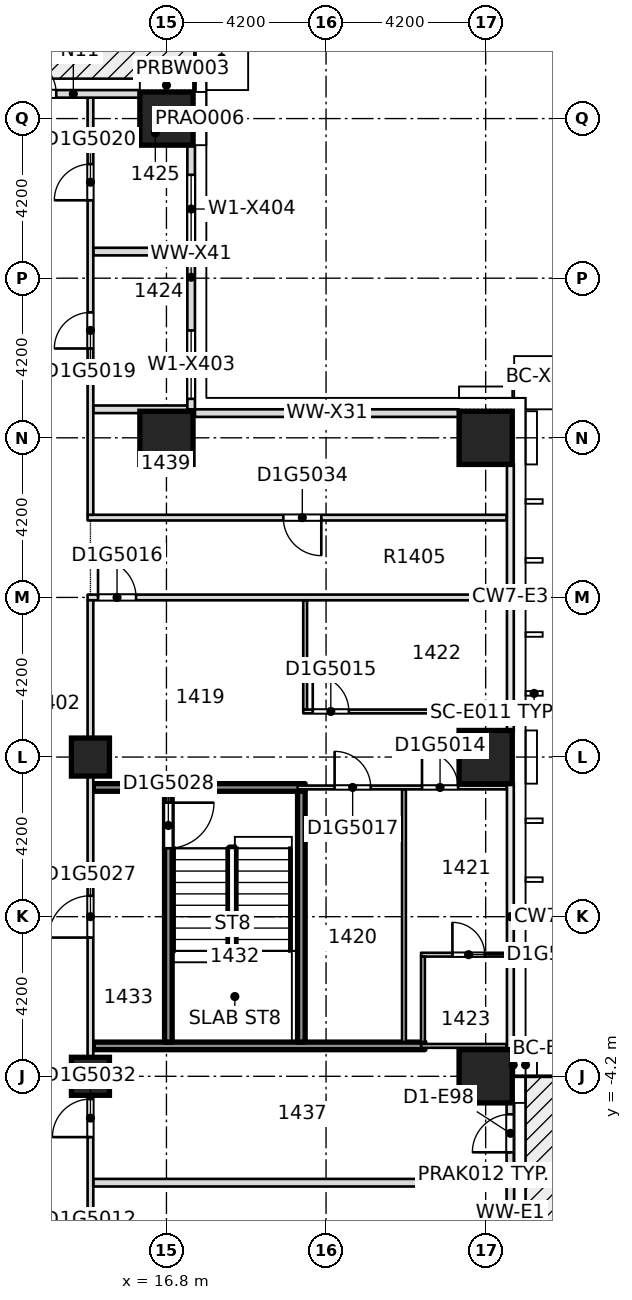
"""IFC4 building model, lengths in metres.
Left out: names, types, materials, properties, quantities, classifications, styles, units other than length and angle.
Written with IfcOpenShell. Run it as: python <this file> out.ifc"""

import sys

from ifc_helpers import new_model, si_unit, direction, frame, frame_2d, origin, origin_2d, place, context, subcontext, project, spatial, rectangle, extrude, element, fill, save


model = new_model("IFC4")
c1 = context("Model", 3, precision=1e-05, world=origin(), true_north=direction((0.0, 1.0)))
c2 = subcontext(c1, "Body", "Model", "MODEL_VIEW")
j1 = project(units=[si_unit("LENGTHUNIT", "METRE"), si_unit("PLANEANGLEUNIT", "RADIAN")], contexts=[c1])
p1 = place(None, origin())
s1 = spatial("IfcSite", under=j1, at=p1, CompositionType="ELEMENT")
p2 = place(p1, origin())
s2 = spatial("IfcBuilding", under=s1, at=p2, CompositionType="ELEMENT")
p3 = place(p2, frame((0.0, 0.0, 62.1)))
s3 = spatial("IfcBuildingStorey", under=s2, at=p3, CompositionType="ELEMENT", Elevation=62.1)
for number, where, z_axis, x_axis in (
    (1, (25.2, -4.2, -0.32), (0.0, 0.0, 1.0), (1.0, 0.0, 0.0)),
    (2, (25.2, 4.2, -0.32), (0.0, 0.0, 1.0), (1.0, 0.0, 0.0)),
    (3, (16.8, 12.6, -0.32), (0.0, 0.0, 1.0), (1.0, 0.0, 0.0)),
    (4, (25.2, 12.6, -0.32), (0.0, 0.0, 1.0), (1.0, 0.0, 0.0)),
    (5, (16.8, 21.0, -0.32), (0.0, 0.0, 1.0), (1.0, 0.0, 0.0)),
):
    element("IfcColumn", number, at=place(p3, frame(where, z_axis=z_axis, x_axis=x_axis)), inside=s3, PredefinedType="COLUMN", context=c2, shape_type="SweptSolid", body=[
        extrude(rectangle(XDim=1.4, YDim=1.4, at=origin_2d()), origin(), (0.0, 0.0, 1.0), 3.45),
    ])
for number, where, z_axis, x_axis in (
    (6, (14.8, -4.2, -0.32), (0.0, 0.0, 1.0), (1.0, 0.0, 0.0)),
    (7, (14.8, 4.2, -0.32), (0.0, 0.0, 1.0), (1.0, 0.0, 0.0)),
):
    element("IfcColumn", number, at=place(p3, frame(where, z_axis=z_axis, x_axis=x_axis)), inside=s3, PredefinedType="COLUMN", context=c2, shape_type="SweptSolid", body=[
        extrude(rectangle(XDim=1.0, YDim=1.0, at=origin_2d()), origin(), (0.0, 0.0, 1.0), 3.45),
    ])
p4 = place(p3, frame((14.875, -7.0, 0.0), z_axis=(0.0, 0.0, 1.0), x_axis=(1.0, 0.0, 0.0)))
e8 = element("IfcWall", 8, at=p4, inside=s3, PredefinedType="PARTITIONING", context=c2, shape_type="SweptSolid", body=[
    extrude(rectangle(XDim=10.875, YDim=0.2, at=frame_2d((5.438, 0.0))), origin(), (0.0, 0.0, 1.0), 3.13),
])
p5 = place(p3, frame((14.875, -3.4, 0.0), z_axis=(0.0, 0.0, 1.0), x_axis=(1.0, 0.0, 0.0)))
e9 = element("IfcWall", 9, at=p5, inside=s3, PredefinedType="SOLIDWALL", context=c2, shape_type="SweptSolid", body=[
    extrude(rectangle(XDim=8.725, YDim=0.2, at=frame_2d((4.363, 0.0))), origin(), (0.0, 0.0, 1.0), 3.13),
])
p6 = place(p3, frame((23.5, -3.4, 0.0), z_axis=(0.0, 0.0, 1.0), x_axis=(1.0, 0.0, 0.0)))
e10 = element("IfcWall", 10, at=p6, inside=s3, PredefinedType="PARTITIONING", context=c2, shape_type="SweptSolid", body=[
    extrude(rectangle(XDim=2.25, YDim=0.1, at=frame_2d((1.125, 0.0))), origin(), (0.0, 0.0, 1.0), 3.13),
])
p7 = place(p3, frame((23.5, -1.0, 0.0), z_axis=(0.0, 0.0, 1.0), x_axis=(1.0, 0.0, 0.0)))
e11 = element("IfcWall", 11, at=p7, inside=s3, PredefinedType="PARTITIONING", context=c2, shape_type="SweptSolid", body=[
    extrude(rectangle(XDim=2.25, YDim=0.1, at=frame_2d((1.125, 0.0))), origin(), (0.0, 0.0, 1.0), 3.13),
])
p8 = place(p7, frame((0.825, 0.0, 0.0)))
e12 = element("IfcOpeningElement", 12, at=p8, cuts=e11, PredefinedType="OPENING", context=c2, shape_type="SweptSolid", body=[
    extrude(rectangle(XDim=0.85, YDim=2.1, at=frame_2d((0.425, 1.05))), frame((0.0, 0.06, 0.0), z_axis=(0.0, -1.0, 0.0), x_axis=(1.0, 0.0, 0.0)), (0.0, 0.0, 1.0), 0.12),
])
p9 = place(p3, frame((14.875, 3.4, 0.0), z_axis=(0.0, 0.0, 1.0), x_axis=(1.0, 0.0, 0.0)))
e13 = element("IfcWall", 13, at=p9, inside=s3, PredefinedType="SOLIDWALL", context=c2, shape_type="SweptSolid", body=[
    extrude(rectangle(XDim=5.575, YDim=0.2, at=frame_2d((2.788, 0.0))), origin(), (0.0, 0.0, 1.0), 3.13),
])
p10 = place(p3, frame((20.25, 3.4, 0.0), z_axis=(0.0, 0.0, 1.0), x_axis=(1.0, 0.0, 0.0)))
e14 = element("IfcWall", 14, at=p10, inside=s3, PredefinedType="PARTITIONING", context=c2, shape_type="SweptSolid", body=[
    extrude(rectangle(XDim=5.5, YDim=0.1, at=frame_2d((2.75, 0.0))), origin(), (0.0, 0.0, 1.0), 3.13),
])
p11 = place(p10, frame((3.275, 0.0, 0.0)))
e15 = element("IfcOpeningElement", 15, at=p11, cuts=e14, PredefinedType="OPENING", context=c2, shape_type="SweptSolid", body=[
    extrude(rectangle(XDim=0.95, YDim=2.1, at=frame_2d((0.475, 1.05))), frame((0.0, 0.06, 0.0), z_axis=(0.0, -1.0, 0.0), x_axis=(1.0, 0.0, 0.0)), (0.0, 0.0, 1.0), 0.12),
])
p12 = place(p10, frame((0.975, 0.0, 0.0)))
e16 = element("IfcOpeningElement", 16, at=p12, cuts=e14, PredefinedType="OPENING", context=c2, shape_type="SweptSolid", body=[
    extrude(rectangle(XDim=0.95, YDim=2.1, at=frame_2d((0.475, 1.05))), frame((0.0, 0.06, 0.0), z_axis=(0.0, -1.0, 0.0), x_axis=(1.0, 0.0, 0.0)), (0.0, 0.0, 1.0), 0.12),
])
p13 = place(p3, frame((20.4, 5.4, 0.0), z_axis=(0.0, 0.0, 1.0), x_axis=(1.0, 0.0, 0.0)))
e17 = element("IfcWall", 17, at=p13, inside=s3, PredefinedType="PARTITIONING", context=c2, shape_type="SweptSolid", body=[
    extrude(rectangle(XDim=5.35, YDim=0.1, at=frame_2d((2.675, 0.0))), origin(), (0.0, 0.0, 1.0), 3.13),
])
p14 = place(p13, frame((0.25, 0.0, 0.0)))
e18 = element("IfcOpeningElement", 18, at=p14, cuts=e17, PredefinedType="OPENING", context=c2, shape_type="SweptSolid", body=[
    extrude(rectangle(XDim=0.95, YDim=2.1, at=frame_2d((0.475, 1.05))), frame((0.0, 0.06, 0.0), z_axis=(0.0, -1.0, 0.0), x_axis=(1.0, 0.0, 0.0)), (0.0, 0.0, 1.0), 0.12),
])
p15 = place(p3, frame((14.725, 8.4, 0.0), z_axis=(0.0, 0.0, 1.0), x_axis=(1.0, 0.0, 0.0)))
e19 = element("IfcWall", 19, at=p15, inside=s3, PredefinedType="PARTITIONING", context=c2, shape_type="SweptSolid", body=[
    extrude(rectangle(XDim=11.025, YDim=0.15, at=frame_2d((5.512, 0.0))), origin(), (0.0, 0.0, 1.0), 3.13),
])
p16 = place(p15, frame((0.275, 0.0, 0.0)))
e20 = element("IfcOpeningElement", 20, at=p16, cuts=e19, PredefinedType="OPENING", context=c2, shape_type="SweptSolid", body=[
    extrude(rectangle(XDim=1.0, YDim=2.1, at=frame_2d((0.5, 1.05))), frame((0.0, 0.085, 0.0), z_axis=(0.0, -1.0, 0.0), x_axis=(1.0, 0.0, 0.0)), (0.0, 0.0, 1.0), 0.17),
])
p17 = place(p3, frame((14.725, 10.5, 0.0), z_axis=(0.0, 0.0, 1.0), x_axis=(1.0, 0.0, 0.0)))
e21 = element("IfcWall", 21, at=p17, inside=s3, PredefinedType="PARTITIONING", context=c2, shape_type="SweptSolid", body=[
    extrude(rectangle(XDim=11.025, YDim=0.15, at=frame_2d((5.512, 0.0))), origin(), (0.0, 0.0, 1.0), 3.13),
])
p18 = place(p17, frame((5.15, 0.0, 0.0)))
e22 = element("IfcOpeningElement", 22, at=p18, cuts=e21, PredefinedType="OPENING", context=c2, shape_type="SweptSolid", body=[
    extrude(rectangle(XDim=1.0, YDim=2.1, at=frame_2d((0.5, 1.05))), frame((0.0, 0.085, 0.0), z_axis=(0.0, -1.0, 0.0), x_axis=(1.0, 0.0, 0.0)), (0.0, 0.0, 1.0), 0.17),
])
for number, where, z_axis, x_axis in (
    (23, (14.875, 13.35, 0.0), (0.0, 0.0, 1.0), (1.0, 0.0, 0.0)),
    (24, (14.875, 17.5, 0.0), (0.0, 0.0, 1.0), (1.0, 0.0, 0.0)),
):
    element("IfcWall", number, at=place(p3, frame(where, z_axis=z_axis, x_axis=x_axis)), inside=s3, PredefinedType="PARTITIONING", context=c2, shape_type="SweptSolid", body=[
        extrude(rectangle(XDim=2.475, YDim=0.2, at=frame_2d((1.238, 0.0))), origin(), (0.0, 0.0, 1.0), 3.13),
    ])
p19 = place(p3, frame((14.8, -9.85, 0.0), z_axis=(0.0, 0.0, 1.0), x_axis=(0.0, 1.0, 0.0)))
e25 = element("IfcWall", 25, at=p19, inside=s3, PredefinedType="PARTITIONING", context=c2, shape_type="SweptSolid", body=[
    extrude(rectangle(XDim=18.175, YDim=0.15, at=frame_2d((9.087, 0.0))), origin(), (0.0, 0.0, 1.0), 3.13),
])
p20 = place(p19, frame((0.3, 0.0, 0.0)))
e26 = element("IfcOpeningElement", 26, at=p20, cuts=e25, PredefinedType="OPENING", context=c2, shape_type="SweptSolid", body=[
    extrude(rectangle(XDim=0.95, YDim=2.1, at=frame_2d((0.475, 1.05))), frame((0.0, 0.085, 0.0), z_axis=(0.0, -1.0, 0.0), x_axis=(1.0, 0.0, 0.0)), (0.0, 0.0, 1.0), 0.17),
])
p21 = place(p19, frame((9.3, 0.0, 0.0)))
e27 = element("IfcOpeningElement", 27, at=p21, cuts=e25, PredefinedType="OPENING", context=c2, shape_type="SweptSolid", body=[
    extrude(rectangle(XDim=1.1, YDim=2.1, at=frame_2d((0.55, 1.05))), frame((0.0, 0.085, 0.0), z_axis=(0.0, -1.0, 0.0), x_axis=(1.0, 0.0, 0.0)), (0.0, 0.0, 1.0), 0.17),
])
p22 = place(p19, frame((4.05, 0.0, 0.0)))
e28 = element("IfcOpeningElement", 28, at=p22, cuts=e25, PredefinedType="OPENING", context=c2, shape_type="SweptSolid", body=[
    extrude(rectangle(XDim=1.0, YDim=2.1, at=frame_2d((0.5, 1.05))), frame((0.0, 0.085, 0.0), z_axis=(0.0, -1.0, 0.0), x_axis=(1.0, 0.0, 0.0)), (0.0, 0.0, 1.0), 0.17),
])
p23 = place(p3, frame((14.8, 10.575, 0.0), z_axis=(0.0, 0.0, 1.0), x_axis=(0.0, 1.0, 0.0)))
e29 = element("IfcWall", 29, at=p23, inside=s3, PredefinedType="PARTITIONING", context=c2, shape_type="SweptSolid", body=[
    extrude(rectangle(XDim=10.975, YDim=0.15, at=frame_2d((5.488, 0.0))), origin(), (0.0, 0.0, 1.0), 3.13),
])
p24 = place(p23, frame((4.375, 0.0, 0.0)))
e30 = element("IfcOpeningElement", 30, at=p24, cuts=e29, PredefinedType="OPENING", context=c2, shape_type="SweptSolid", body=[
    extrude(rectangle(XDim=0.95, YDim=2.1, at=frame_2d((0.475, 1.05))), frame((0.0, 0.085, 0.0), z_axis=(0.0, -1.0, 0.0), x_axis=(1.0, 0.0, 0.0)), (0.0, 0.0, 1.0), 0.17),
])
p25 = place(p23, frame((8.275, 0.0, 0.0)))
e31 = element("IfcOpeningElement", 31, at=p25, cuts=e29, PredefinedType="OPENING", context=c2, shape_type="SweptSolid", body=[
    extrude(rectangle(XDim=0.95, YDim=2.1, at=frame_2d((0.475, 1.05))), frame((0.0, 0.085, 0.0), z_axis=(0.0, -1.0, 0.0), x_axis=(1.0, 0.0, 0.0)), (0.0, 0.0, 1.0), 0.17),
])
p26 = place(p3, frame((16.85, -3.3, 0.0), z_axis=(0.0, 0.0, 1.0), x_axis=(0.0, 1.0, 0.0)))
e32 = element("IfcWall", 32, at=p26, inside=s3, PredefinedType="SOLIDWALL", context=c2, shape_type="SweptSolid", body=[
    extrude(rectangle(XDim=6.6, YDim=0.2, at=frame_2d((3.3, 0.0))), origin(), (0.0, 0.0, 1.0), 3.13),
])
p27 = place(p26, frame((5.1, 0.0, 0.0)))
e33 = element("IfcOpeningElement", 33, at=p27, cuts=e32, PredefinedType="OPENING", context=c2, shape_type="SweptSolid", body=[
    extrude(rectangle(XDim=1.2, YDim=2.1, at=frame_2d((0.6, 1.05))), frame((0.0, 0.11, 0.0), z_axis=(0.0, -1.0, 0.0), x_axis=(1.0, 0.0, 0.0)), (0.0, 0.0, 1.0), 0.22),
])
p28 = place(p3, frame((20.45, 5.45, 0.0), z_axis=(0.0, 0.0, 1.0), x_axis=(0.0, 1.0, 0.0)))
e34 = element("IfcWall", 34, at=p28, inside=s3, PredefinedType="PARTITIONING", context=c2, shape_type="SweptSolid", body=[
    extrude(rectangle(XDim=2.875, YDim=0.1, at=frame_2d((1.438, 0.0))), origin(), (0.0, 0.0, 1.0), 3.13),
])
p29 = place(p3, frame((23.05, -3.3, 0.0), z_axis=(0.0, 0.0, 1.0), x_axis=(0.0, 1.0, 0.0)))
e35 = element("IfcWall", 35, at=p29, inside=s3, PredefinedType="PARTITIONING", context=c2, shape_type="SweptSolid", body=[
    extrude(rectangle(XDim=6.65, YDim=0.1, at=frame_2d((3.325, 0.0))), origin(), (0.0, 0.0, 1.0), 3.13),
])
p30 = place(p3, frame((23.55, -3.3, 0.0), z_axis=(0.0, 0.0, 1.0), x_axis=(0.0, 1.0, 0.0)))
e36 = element("IfcWall", 36, at=p30, inside=s3, PredefinedType="PARTITIONING", context=c2, shape_type="SweptSolid", body=[
    extrude(rectangle(XDim=2.25, YDim=0.1, at=frame_2d((1.125, 0.0))), origin(), (0.0, 0.0, 1.0), 3.13),
])
p31 = place(p3, frame((25.85, -11.9, 0.0), z_axis=(0.0, 0.0, 1.0), x_axis=(0.0, 1.0, 0.0)))
e37 = element("IfcWall", 37, at=p31, inside=s3, PredefinedType="STANDARD", context=c2, shape_type="SweptSolid", body=[
    extrude(rectangle(XDim=7.0, YDim=0.2, at=frame_2d((3.5, 0.0))), origin(), (0.0, 0.0, 1.0), 3.13),
])
p32 = place(p31, frame((0.3, 0.0, 0.2)))
e38 = element("IfcOpeningElement", 38, at=p32, cuts=e37, PredefinedType="OPENING", context=c2, shape_type="SweptSolid", body=[
    extrude(rectangle(XDim=1.8, YDim=2.65, at=frame_2d((0.9, 1.325))), frame((0.0, 0.11, 0.0), z_axis=(0.0, -1.0, 0.0), x_axis=(1.0, 0.0, 0.0)), (0.0, 0.0, 1.0), 0.22),
])
p33 = place(p31, frame((2.2, 0.0, 0.0)))
e39 = element("IfcOpeningElement", 39, at=p33, cuts=e37, PredefinedType="OPENING", context=c2, shape_type="SweptSolid", body=[
    extrude(rectangle(XDim=1.0, YDim=2.4, at=frame_2d((0.5, 1.2))), frame((0.0, 0.11, 0.0), z_axis=(0.0, -1.0, 0.0), x_axis=(1.0, 0.0, 0.0)), (0.0, 0.0, 1.0), 0.22),
])
p34 = place(p31, frame((5.7, 0.0, 0.0)))
e40 = element("IfcOpeningElement", 40, at=p34, cuts=e37, PredefinedType="OPENING", context=c2, shape_type="SweptSolid", body=[
    extrude(rectangle(XDim=1.0, YDim=2.4, at=frame_2d((0.5, 1.2))), frame((0.0, 0.11, 0.0), z_axis=(0.0, -1.0, 0.0), x_axis=(1.0, 0.0, 0.0)), (0.0, 0.0, 1.0), 0.22),
])
p35 = place(p3, frame((24.5, 13.25, 0.0), z_axis=(0.0, 0.0, 1.0), x_axis=(-1.0, 0.0, 0.0)))
e41 = element("IfcWall", 41, at=p35, inside=s3, PredefinedType="STANDARD", context=c2, shape_type="SweptSolid", body=[
    extrude(rectangle(XDim=6.95, YDim=0.2, at=frame_2d((3.475, 0.0))), origin(), (0.0, 0.0, 1.0), 3.13),
])
p36 = place(p3, frame((17.45, 13.35, 0.0), z_axis=(0.0, 0.0, 1.0), x_axis=(0.0, 1.0, 0.0)))
e42 = element("IfcWall", 42, at=p36, inside=s3, PredefinedType="STANDARD", context=c2, shape_type="SweptSolid", body=[
    extrude(rectangle(XDim=6.95, YDim=0.2, at=frame_2d((3.475, 0.0))), origin(), (0.0, 0.0, 1.0), 3.13),
])
p37 = place(p36, frame((0.275, 0.0, 0.2)))
e43 = element("IfcOpeningElement", 43, at=p37, cuts=e42, PredefinedType="OPENING", context=c2, shape_type="SweptSolid", body=[
    extrude(rectangle(XDim=1.8, YDim=2.65, at=frame_2d((0.9, 1.325))), frame((0.0, 0.11, 0.0), z_axis=(0.0, -1.0, 0.0), x_axis=(1.0, 0.0, 0.0)), (0.0, 0.0, 1.0), 0.22),
])
p38 = place(p36, frame((4.37, 0.0, 0.2)))
e44 = element("IfcOpeningElement", 44, at=p38, cuts=e42, PredefinedType="OPENING", context=c2, shape_type="SweptSolid", body=[
    extrude(rectangle(XDim=1.8, YDim=2.65, at=frame_2d((0.9, 1.325))), frame((0.0, 0.11, 0.0), z_axis=(0.0, -1.0, 0.0), x_axis=(1.0, 0.0, 0.0)), (0.0, 0.0, 1.0), 0.22),
])
p39 = place(p3, frame((16.1, 21.65, 0.0), z_axis=(0.0, 0.0, 1.0), x_axis=(-1.0, 0.0, 0.0)))
e45 = element("IfcWall", 45, at=p39, inside=s3, PredefinedType="STANDARD", context=c2, shape_type="SweptSolid", body=[
    extrude(rectangle(XDim=3.5, YDim=0.2, at=frame_2d((1.75, 0.0))), origin(), (0.0, 0.0, 1.0), 3.13),
])
p40 = place(p39, frame((2.2, 0.0, 0.0)))
e46 = element("IfcOpeningElement", 46, at=p40, cuts=e45, PredefinedType="OPENING", context=c2, shape_type="SweptSolid", body=[
    extrude(rectangle(XDim=1.0, YDim=2.4, at=frame_2d((0.5, 1.2))), frame((0.0, 0.11, 0.0), z_axis=(0.0, -1.0, 0.0), x_axis=(1.0, 0.0, 0.0)), (0.0, 0.0, 1.0), 0.22),
])
p41 = place(p3, frame((20.35, -3.3, 0.0), z_axis=(0.0, 0.0, 1.0), x_axis=(0.0, 1.0, 0.0)))
e47 = element("IfcWall", 47, at=p41, inside=s3, PredefinedType="SOLIDWALL", context=c2, shape_type="SweptSolid", body=[
    extrude(rectangle(XDim=6.6, YDim=0.2, at=frame_2d((3.3, 0.0))), origin(), (0.0, 0.0, 1.0), 3.13),
])
p42 = place(p11, origin())
e48 = element("IfcDoor", 48, at=p42, inside=s3, OperationType="SINGLE_SWING_RIGHT", PredefinedType="DOOR", context=c2, shape_type="SweptSolid", body=[
    extrude(rectangle(XDim=0.95, YDim=2.1, at=frame_2d((0.475, 1.05))), frame((0.0, 0.025, 0.0), z_axis=(0.0, -1.0, 0.0), x_axis=(1.0, 0.0, 0.0)), (0.0, 0.0, 1.0), 0.05),
])
fill(e15, e48)
p43 = place(p14, origin())
e49 = element("IfcDoor", 49, at=p43, inside=s3, OperationType="SINGLE_SWING_LEFT", PredefinedType="DOOR", context=c2, shape_type="SweptSolid", body=[
    extrude(rectangle(XDim=0.95, YDim=2.1, at=frame_2d((0.475, 1.05))), frame((0.0, 0.025, 0.0), z_axis=(0.0, -1.0, 0.0), x_axis=(1.0, 0.0, 0.0)), (0.0, 0.0, 1.0), 0.05),
])
fill(e18, e49)
p44 = place(p16, origin())
e50 = element("IfcDoor", 50, at=p44, inside=s3, OperationType="SINGLE_SWING_RIGHT", PredefinedType="DOOR", context=c2, shape_type="SweptSolid", body=[
    extrude(rectangle(XDim=1.0, YDim=2.1, at=frame_2d((0.5, 1.05))), frame((0.0, 0.025, 0.0), z_axis=(0.0, -1.0, 0.0), x_axis=(1.0, 0.0, 0.0)), (0.0, 0.0, 1.0), 0.05),
])
fill(e20, e50)
p45 = place(p12, origin())
e51 = element("IfcDoor", 51, at=p45, inside=s3, OperationType="SINGLE_SWING_RIGHT", PredefinedType="DOOR", context=c2, shape_type="SweptSolid", body=[
    extrude(rectangle(XDim=0.95, YDim=2.1, at=frame_2d((0.475, 1.05))), frame((0.0, 0.025, 0.0), z_axis=(0.0, -1.0, 0.0), x_axis=(1.0, 0.0, 0.0)), (0.0, 0.0, 1.0), 0.05),
])
fill(e16, e51)
p46 = place(p8, origin())
e52 = element("IfcDoor", 52, at=p46, inside=s3, OperationType="SINGLE_SWING_RIGHT", PredefinedType="DOOR", context=c2, shape_type="SweptSolid", body=[
    extrude(rectangle(XDim=0.85, YDim=2.1, at=frame_2d((0.425, 1.05))), frame((0.0, 0.025, 0.0), z_axis=(0.0, -1.0, 0.0), x_axis=(1.0, 0.0, 0.0)), (0.0, 0.0, 1.0), 0.05),
])
fill(e12, e52)
p47 = place(p24, origin())
e53 = element("IfcDoor", 53, at=p47, inside=s3, OperationType="SINGLE_SWING_RIGHT", PredefinedType="DOOR", context=c2, shape_type="SweptSolid", body=[
    extrude(rectangle(XDim=0.95, YDim=2.1, at=frame_2d((0.475, 1.05))), frame((0.0, 0.025, 0.0), z_axis=(0.0, -1.0, 0.0), x_axis=(1.0, 0.0, 0.0)), (0.0, 0.0, 1.0), 0.05),
])
fill(e30, e53)
p48 = place(p25, origin())
e54 = element("IfcDoor", 54, at=p48, inside=s3, OperationType="SINGLE_SWING_LEFT", PredefinedType="DOOR", context=c2, shape_type="SweptSolid", body=[
    extrude(rectangle(XDim=0.95, YDim=2.1, at=frame_2d((0.475, 1.05))), frame((0.0, 0.025, 0.0), z_axis=(0.0, -1.0, 0.0), x_axis=(1.0, 0.0, 0.0)), (0.0, 0.0, 1.0), 0.05),
])
fill(e31, e54)
p49 = place(p21, origin())
e55 = element("IfcDoor", 55, at=p49, inside=s3, OperationType="SINGLE_SWING_LEFT", PredefinedType="DOOR", context=c2, shape_type="SweptSolid", body=[
    extrude(rectangle(XDim=1.1, YDim=2.1, at=frame_2d((0.55, 1.05))), frame((0.0, 0.025, 0.0), z_axis=(0.0, -1.0, 0.0), x_axis=(1.0, 0.0, 0.0)), (0.0, 0.0, 1.0), 0.05),
])
fill(e27, e55)
p50 = place(p27, origin())
e56 = element("IfcDoor", 56, at=p50, inside=s3, OperationType="SINGLE_SWING_LEFT", PredefinedType="DOOR", context=c2, shape_type="SweptSolid", body=[
    extrude(rectangle(XDim=1.2, YDim=2.1, at=frame_2d((0.6, 1.05))), frame((0.0, 0.025, 0.0), z_axis=(0.0, -1.0, 0.0), x_axis=(1.0, 0.0, 0.0)), (0.0, 0.0, 1.0), 0.05),
])
fill(e33, e56)
p51 = place(p22, origin())
e57 = element("IfcDoor", 57, at=p51, inside=s3, OperationType="SINGLE_SWING_RIGHT", PredefinedType="DOOR", context=c2, shape_type="SweptSolid", body=[
    extrude(rectangle(XDim=1.0, YDim=2.1, at=frame_2d((0.5, 1.05))), frame((0.0, 0.025, 0.0), z_axis=(0.0, -1.0, 0.0), x_axis=(1.0, 0.0, 0.0)), (0.0, 0.0, 1.0), 0.05),
])
fill(e28, e57)
p52 = place(p18, origin())
e58 = element("IfcDoor", 58, at=p52, inside=s3, OperationType="SINGLE_SWING_RIGHT", PredefinedType="DOOR", context=c2, shape_type="SweptSolid", body=[
    extrude(rectangle(XDim=1.0, YDim=2.1, at=frame_2d((0.5, 1.05))), frame((0.0, 0.025, 0.0), z_axis=(0.0, -1.0, 0.0), x_axis=(1.0, 0.0, 0.0)), (0.0, 0.0, 1.0), 0.05),
])
fill(e22, e58)
p53 = place(p34, origin())
e59 = element("IfcDoor", 59, at=p53, inside=s3, OperationType="SINGLE_SWING_LEFT", PredefinedType="DOOR", context=c2, shape_type="SweptSolid", body=[
    extrude(rectangle(XDim=1.0, YDim=2.4, at=frame_2d((0.5, 1.2))), frame((0.0, 0.025, 0.0), z_axis=(0.0, -1.0, 0.0), x_axis=(1.0, 0.0, 0.0)), (0.0, 0.0, 1.0), 0.05),
])
fill(e40, e59)
p54 = place(p37, origin())
e60 = element("IfcWindow", 60, at=p54, inside=s3, PartitioningType="SINGLE_PANEL", PredefinedType="WINDOW", context=c2, shape_type="SweptSolid", body=[
    extrude(rectangle(XDim=1.8, YDim=2.65, at=frame_2d((0.9, 1.325))), frame((0.0, 0.03, 0.0), z_axis=(0.0, -1.0, 0.0), x_axis=(1.0, 0.0, 0.0)), (0.0, 0.0, 1.0), 0.06),
])
fill(e43, e60)
p55 = place(p38, origin())
e61 = element("IfcWindow", 61, at=p55, inside=s3, PartitioningType="SINGLE_PANEL", PredefinedType="WINDOW", context=c2, shape_type="SweptSolid", body=[
    extrude(rectangle(XDim=1.8, YDim=2.65, at=frame_2d((0.9, 1.325))), frame((0.0, 0.03, 0.0), z_axis=(0.0, -1.0, 0.0), x_axis=(1.0, 0.0, 0.0)), (0.0, 0.0, 1.0), 0.06),
])
fill(e44, e61)
p56 = place(p40, origin())
e62 = element("IfcDoor", 62, at=p56, inside=s3, OperationType="SINGLE_SWING_LEFT", PredefinedType="DOOR", context=c2, shape_type="SweptSolid", body=[
    extrude(rectangle(XDim=1.0, YDim=2.4, at=frame_2d((0.5, 1.2))), frame((0.0, 0.025, 0.0), z_axis=(0.0, -1.0, 0.0), x_axis=(1.0, 0.0, 0.0)), (0.0, 0.0, 1.0), 0.05),
])
fill(e46, e62)
save(model, sys.argv[1])
